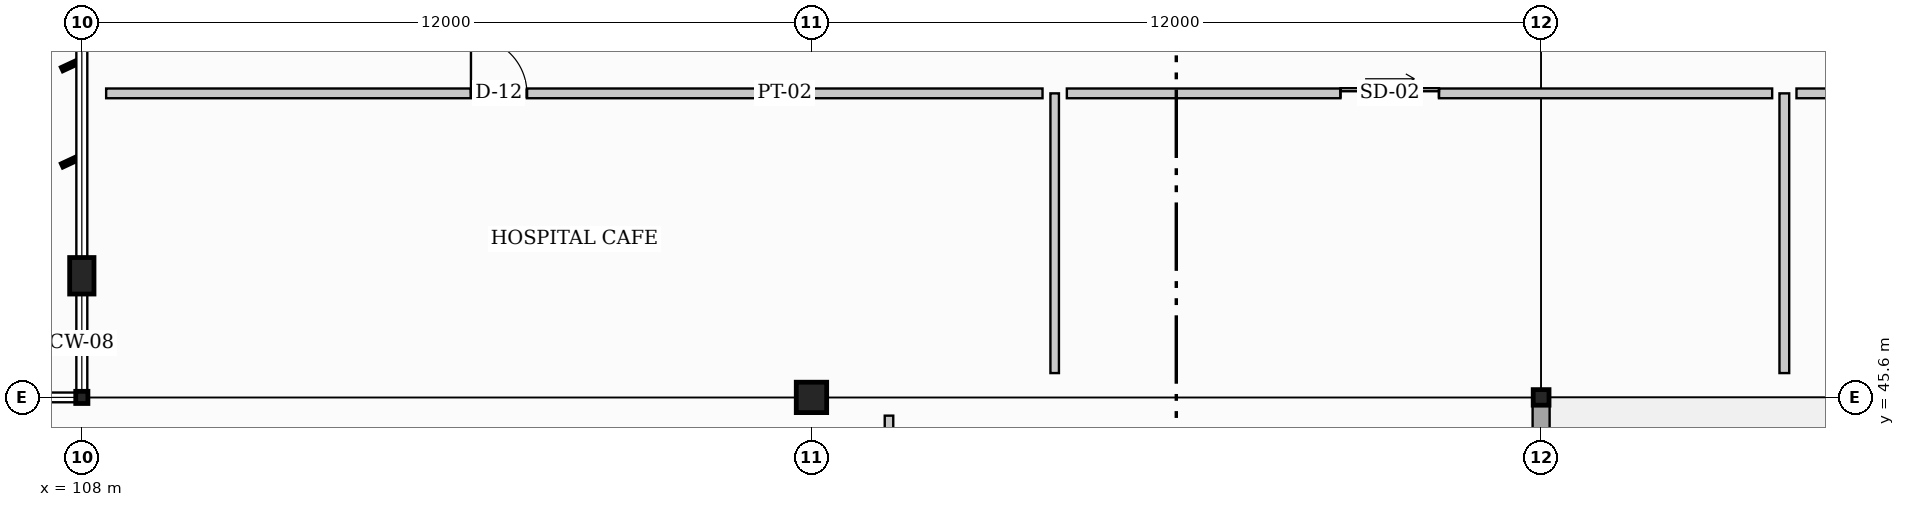
"""IFC4 building model, lengths in metres.
Left out: names, types, materials, properties, quantities, classifications, styles, units other than length and angle.
Written with IfcOpenShell. Run it as: python <this file> out.ifc"""

import sys

from ifc_helpers import new_model, si_unit, direction, frame, frame_2d, origin, origin_2d, place, context, subcontext, project, spatial, rectangle, hollow_rectangle, i_section, extrude, element, fill, save


model = new_model("IFC4")
c1 = context("Model", 3, precision=1e-05, world=origin(), true_north=direction((0.0, 1.0)))
c2 = subcontext(c1, "Body", "Model", "MODEL_VIEW")
j1 = project(units=[si_unit("LENGTHUNIT", "METRE"), si_unit("PLANEANGLEUNIT", "RADIAN")], contexts=[c1])
p1 = place(None, origin())
s1 = spatial("IfcSite", under=j1, at=p1, CompositionType="ELEMENT")
p2 = place(p1, origin())
s2 = spatial("IfcBuilding", under=s1, at=p2, CompositionType="ELEMENT")
p3 = place(p2, origin())
s3 = spatial("IfcBuildingStorey", under=s2, at=p3, CompositionType="ELEMENT", Elevation=0.0)
p4 = place(p3, frame((108.0, 45.6, 0.0), z_axis=(0.0, 0.0, 1.0), x_axis=(0.0, 1.0, 0.0)))
e1 = element("IfcColumn", 1, at=p4, inside=s3, PredefinedType="COLUMN", context=c2, shape_type="SweptSolid", body=[
    extrude(hollow_rectangle(XDim=0.2, YDim=0.2, WallThickness=0.01, at=origin_2d()), origin(), (0.0, 0.0, 1.0), 4.8),
])
p5 = place(p3, frame((120.0, 45.6, 0.0), z_axis=(0.0, 0.0, 1.0), x_axis=(1.0, 0.0, 0.0)))
e2 = element("IfcColumn", 2, at=p5, inside=s3, PredefinedType="COLUMN", context=c2, shape_type="SweptSolid", body=[
    extrude(i_section(OverallWidth=0.5, OverallDepth=0.5, WebThickness=0.022, FlangeThickness=0.036, at=origin_2d()), origin(), (0.0, 0.0, 1.0), 4.8),
])
p6 = place(p3, frame((132.0, 45.6, 0.0), z_axis=(0.0, 0.0, 1.0), x_axis=(0.0, 1.0, 0.0)))
e3 = element("IfcColumn", 3, at=p6, inside=s3, PredefinedType="COLUMN", context=c2, shape_type="SweptSolid", body=[
    extrude(i_section(OverallWidth=0.256, OverallDepth=0.26, WebThickness=0.01, FlangeThickness=0.017, at=origin_2d()), origin(), (0.0, 0.0, 1.0), 4.8),
])
p7 = place(p3, frame((108.0, 47.6, 0.0), z_axis=(0.0, 0.0, 1.0), x_axis=(1.0, 0.0, 0.0)))
e4 = element("IfcColumn", 4, at=p7, inside=s3, PredefinedType="PILASTER", context=c2, shape_type="SweptSolid", body=[
    extrude(rectangle(XDim=0.4, YDim=0.6, at=origin_2d()), origin(), (0.0, 0.0, 1.0), 4.8),
])
p8 = place(p3, frame((132.0, 45.6, 0.0), z_axis=(0.0, 0.0, 1.0), x_axis=(0.0, -1.0, 0.0)))
e5 = element("IfcWall", 5, at=p8, inside=s3, PredefinedType="STANDARD", context=c2, shape_type="SweptSolid", body=[
    extrude(rectangle(XDim=12.0, YDim=0.28, at=frame_2d((6.0, 0.0))), origin(), (0.0, 0.0, 1.0), 3.53),
])
p9 = place(p3, frame((108.4, 50.6, 0.0), z_axis=(0.0, 0.0, 1.0), x_axis=(1.0, 0.0, 0.0)))
e6 = element("IfcWall", 6, at=p9, inside=s3, PredefinedType="PARTITIONING", context=c2, shape_type="SweptSolid", body=[
    extrude(rectangle(XDim=15.4, YDim=0.16, at=frame_2d((7.7, 0.0))), origin(), (0.0, 0.0, 1.0), 4.445),
])
p10 = place(p9, frame((6.0, 0.0, 0.0)))
e7 = element("IfcOpeningElement", 7, at=p10, cuts=e6, PredefinedType="OPENING", context=c2, shape_type="SweptSolid", body=[
    extrude(rectangle(XDim=0.92, YDim=2.04, at=frame_2d((0.46, 1.02))), frame((0.0, 0.09, 0.0), z_axis=(0.0, -1.0, 0.0), x_axis=(1.0, 0.0, 0.0)), (0.0, 0.0, 1.0), 0.18),
])
p11 = place(p3, frame((124.2, 50.6, 0.0), z_axis=(0.0, 0.0, 1.0), x_axis=(1.0, 0.0, 0.0)))
e8 = element("IfcWall", 8, at=p11, inside=s3, PredefinedType="PARTITIONING", context=c2, shape_type="SweptSolid", body=[
    extrude(rectangle(XDim=11.6, YDim=0.16, at=frame_2d((5.8, 0.0))), origin(), (0.0, 0.0, 1.0), 4.445),
])
p12 = place(p11, frame((4.5, 0.0, 0.0)))
e9 = element("IfcOpeningElement", 9, at=p12, cuts=e8, PredefinedType="OPENING", context=c2, shape_type="SweptSolid", body=[
    extrude(rectangle(XDim=1.62, YDim=2.3, at=frame_2d((0.81, 1.15))), frame((0.0, 0.09, 0.0), z_axis=(0.0, -1.0, 0.0), x_axis=(1.0, 0.0, 0.0)), (0.0, 0.0, 1.0), 0.18),
])
p13 = place(p3, frame((136.2, 50.6, 0.0), z_axis=(0.0, 0.0, 1.0), x_axis=(1.0, 0.0, 0.0)))
e10 = element("IfcWall", 10, at=p13, inside=s3, PredefinedType="PARTITIONING", context=c2, shape_type="SweptSolid", body=[
    extrude(rectangle(XDim=7.4, YDim=0.16, at=frame_2d((3.7, 0.0))), origin(), (0.0, 0.0, 1.0), 4.445),
])
p14 = place(p13, frame((5.0, 0.0, 0.0)))
e11 = element("IfcOpeningElement", 11, at=p14, cuts=e10, PredefinedType="OPENING", context=c2, shape_type="SweptSolid", body=[
    extrude(rectangle(XDim=1.25, YDim=2.15, at=frame_2d((0.625, 1.075))), frame((0.0, 0.09, 0.0), z_axis=(0.0, -1.0, 0.0), x_axis=(1.0, 0.0, 0.0)), (0.0, 0.0, 1.0), 0.18),
])
p15 = place(p3, frame((124.0, 46.0, 0.0), z_axis=(0.0, 0.0, 1.0), x_axis=(0.0, 1.0, 0.0)))
e12 = element("IfcWall", 12, at=p15, inside=s3, PredefinedType="PARTITIONING", context=c2, shape_type="SweptSolid", body=[
    extrude(rectangle(XDim=4.6, YDim=0.14, at=frame_2d((2.3, 0.0))), origin(), (0.0, 0.0, 1.0), 4.445),
])
p16 = place(p3, frame((136.0, 46.0, 0.0), z_axis=(0.0, 0.0, 1.0), x_axis=(0.0, 1.0, 0.0)))
e13 = element("IfcWall", 13, at=p16, inside=s3, PredefinedType="PARTITIONING", context=c2, shape_type="SweptSolid", body=[
    extrude(rectangle(XDim=4.6, YDim=0.16, at=frame_2d((2.3, 0.0))), origin(), (0.0, 0.0, 1.0), 4.445),
])
p17 = place(p3, frame((121.275, 17.8, 0.0), z_axis=(0.0, 0.0, 1.0), x_axis=(0.0, 1.0, 0.0)))
e14 = element("IfcWall", 14, at=p17, inside=s3, PredefinedType="PARTITIONING", context=c2, shape_type="SweptSolid", body=[
    extrude(rectangle(XDim=27.5, YDim=0.14, at=frame_2d((13.75, 0.0))), origin(), (0.0, 0.0, 1.0), 3.53),
])
p18 = place(p10, origin())
e15 = element("IfcDoor", 15, at=p18, inside=s3, OperationType="SINGLE_SWING_LEFT", PredefinedType="DOOR", context=c2, shape_type="SweptSolid", body=[
    extrude(rectangle(XDim=0.92, YDim=2.04, at=frame_2d((0.46, 1.02))), frame((0.0, 0.025, 0.0), z_axis=(0.0, -1.0, 0.0), x_axis=(1.0, 0.0, 0.0)), (0.0, 0.0, 1.0), 0.05),
])
fill(e7, e15)
p19 = place(p12, origin())
e16 = element("IfcDoor", 16, at=p19, inside=s3, OperationType="SLIDING_TO_RIGHT", PredefinedType="DOOR", context=c2, shape_type="SweptSolid", body=[
    extrude(rectangle(XDim=1.62, YDim=2.3, at=frame_2d((0.81, 1.15))), frame((0.0, 0.025, 0.0), z_axis=(0.0, -1.0, 0.0), x_axis=(1.0, 0.0, 0.0)), (0.0, 0.0, 1.0), 0.05),
])
fill(e9, e16)
save(model, sys.argv[1])
